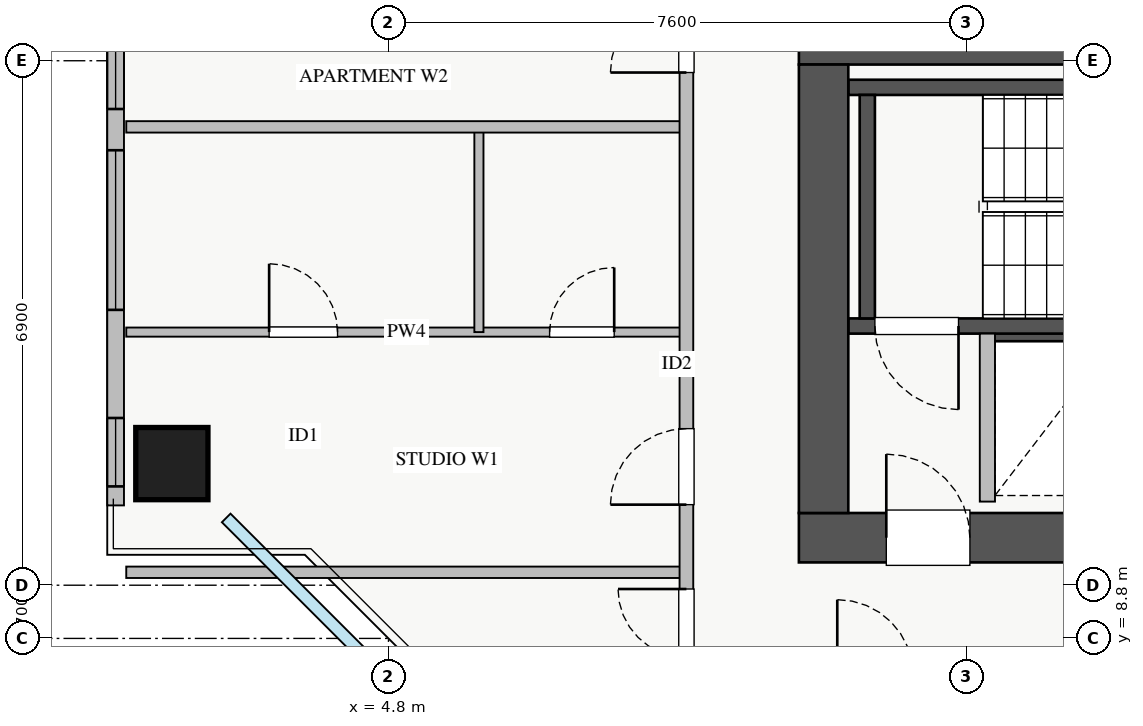
"""IFC4 building model, lengths in metres.
Left out: names, types, materials, properties, quantities, classifications, styles, units other than length and angle.
Written with IfcOpenShell. Run it as: python <this file> out.ifc"""

import sys

from ifc_helpers import new_model, si_unit, direction, frame, frame_2d, origin, origin_2d, place, context, subcontext, project, spatial, rectangle, extrude, source, transform, mapped, element, fill, save


model = new_model("IFC4")
c1 = context("Model", 3, precision=1e-05, world=origin(), true_north=direction((0.0, 1.0)))
c2 = subcontext(c1, "Body", "Model", "MODEL_VIEW")
j1 = project(units=[si_unit("LENGTHUNIT", "METRE"), si_unit("PLANEANGLEUNIT", "RADIAN")], contexts=[c1])
p1 = place(None, origin())
s1 = spatial("IfcSite", under=j1, at=p1, CompositionType="ELEMENT")
p2 = place(p1, origin())
s2 = spatial("IfcBuilding", under=s1, at=p2, CompositionType="ELEMENT")
p3 = place(p2, frame((0.0, 0.0, 179.5)))
s3 = spatial("IfcBuildingStorey", under=s2, at=p3, CompositionType="ELEMENT", Elevation=179.5)
p4 = place(p3, frame((12.68, 12.8, 0.0), z_axis=(0.0, 0.0, 1.0), x_axis=(1.0, 0.0, 0.0)))
e1 = element("IfcWall", 1, at=p4, inside=s3, PredefinedType="SHEAR", context=c2, shape_type="SweptSolid", body=[
    extrude(rectangle(XDim=1.94, YDim=0.18, at=frame_2d((0.97, 0.0))), origin(), (0.0, 0.0, 1.0), 3.07),
])
p5 = place(p3, frame((10.85, 12.91, 0.0), z_axis=(0.0, 0.0, 1.0), x_axis=(1.0, 0.0, 0.0)))
e2 = element("IfcWall", 2, at=p5, inside=s3, PredefinedType="SHEAR", context=c2, shape_type="SweptSolid", body=[
    extrude(rectangle(XDim=7.3, YDim=0.2, at=frame_2d((3.65, 0.0))), origin(), (0.0, 0.0, 1.0), 3.25),
])
p6 = place(p5, frame((0.35, 0.0, 0.0)))
e3 = element("IfcOpeningElement", 3, at=p6, cuts=e2, PredefinedType="OPENING", context=c2, shape_type="SweptSolid", body=[
    extrude(rectangle(XDim=1.1, YDim=2.05, at=frame_2d((0.55, 1.025))), frame((0.0, 0.11, 0.0), z_axis=(0.0, -1.0, 0.0), x_axis=(1.0, 0.0, 0.0)), (0.0, 0.0, 1.0), 0.22),
])
p7 = place(p3, frame((10.85, 16.05, 0.0), z_axis=(0.0, 0.0, 1.0), x_axis=(1.0, 0.0, 0.0)))
e4 = element("IfcWall", 4, at=p7, inside=s3, PredefinedType="SHEAR", context=c2, shape_type="SweptSolid", body=[
    extrude(rectangle(XDim=7.3, YDim=0.2, at=frame_2d((3.65, 0.0))), origin(), (0.0, 0.0, 1.0), 3.25),
])
p8 = place(p3, frame((11.1, 13.01, 0.0), z_axis=(0.0, 0.0, 1.0), x_axis=(0.0, 1.0, 0.0)))
e5 = element("IfcWall", 5, at=p8, inside=s3, PredefinedType="SHEAR", context=c2, shape_type="SweptSolid", body=[
    extrude(rectangle(XDim=2.94, YDim=0.2, at=frame_2d((1.47, 0.0))), origin(), (0.0, 0.0, 1.0), 3.25),
])
p9 = place(p3, frame((10.2, 10.125, 0.0), z_axis=(0.0, 0.0, 1.0), x_axis=(1.0, 0.0, 0.0)))
e6 = element("IfcWall", 6, at=p9, inside=s3, PredefinedType="SHEAR", context=c2, shape_type="SweptSolid", body=[
    extrude(rectangle(XDim=17.6, YDim=0.65, at=frame_2d((8.8, 0.0))), origin(), (0.0, 0.0, 1.0), 3.25),
])
p10 = place(p9, frame((1.15, 0.0, 0.0)))
e7 = element("IfcOpeningElement", 7, at=p10, cuts=e6, PredefinedType="OPENING", context=c2, shape_type="SweptSolid", body=[
    extrude(rectangle(XDim=1.1, YDim=2.05, at=frame_2d((0.55, 1.025))), frame((0.0, 0.335, 0.0), z_axis=(0.0, -1.0, 0.0), x_axis=(1.0, 0.0, 0.0)), (0.0, 0.0, 1.0), 0.67),
])
p11 = place(p9, frame((8.3, 0.0, 0.0)))
e8 = element("IfcOpeningElement", 8, at=p11, cuts=e6, PredefinedType="OPENING", context=c2, shape_type="SweptSolid", body=[
    extrude(rectangle(XDim=1.1, YDim=2.05, at=frame_2d((0.55, 1.025))), frame((0.0, 0.335, 0.0), z_axis=(0.0, -1.0, 0.0), x_axis=(1.0, 0.0, 0.0)), (0.0, 0.0, 1.0), 0.67),
])
p12 = place(p9, frame((4.9, 0.0, 0.0)))
e9 = element("IfcOpeningElement", 9, at=p12, cuts=e6, PredefinedType="OPENING", context=c2, shape_type="SweptSolid", body=[
    extrude(rectangle(XDim=1.1, YDim=2.05, at=frame_2d((0.55, 1.025))), frame((0.0, 0.335, 0.0), z_axis=(0.0, -1.0, 0.0), x_axis=(1.0, 0.0, 0.0)), (0.0, 0.0, 1.0), 0.67),
])
p13 = place(p9, frame((14.74, 0.0, 0.0)))
e10 = element("IfcOpeningElement", 10, at=p13, cuts=e6, PredefinedType="OPENING", context=c2, shape_type="SweptSolid", body=[
    extrude(rectangle(XDim=1.0, YDim=2.05, at=frame_2d((0.5, 1.025))), frame((0.0, 0.335, 0.0), z_axis=(0.0, -1.0, 0.0), x_axis=(1.0, 0.0, 0.0)), (0.0, 0.0, 1.0), 0.67),
])
p14 = place(p9, frame((10.64, 0.0, 0.0)))
e11 = element("IfcOpeningElement", 11, at=p14, cuts=e6, PredefinedType="OPENING", context=c2, shape_type="SweptSolid", body=[
    extrude(rectangle(XDim=1.0, YDim=2.05, at=frame_2d((0.5, 1.025))), frame((0.0, 0.335, 0.0), z_axis=(0.0, -1.0, 0.0), x_axis=(1.0, 0.0, 0.0)), (0.0, 0.0, 1.0), 0.67),
])
p15 = place(p9, frame((13.09, 0.0, 0.0)))
e12 = element("IfcOpeningElement", 12, at=p15, cuts=e6, PredefinedType="OPENING", context=c2, shape_type="SweptSolid", body=[
    extrude(rectangle(XDim=1.0, YDim=2.05, at=frame_2d((0.5, 1.025))), frame((0.0, 0.335, 0.0), z_axis=(0.0, -1.0, 0.0), x_axis=(1.0, 0.0, 0.0)), (0.0, 0.0, 1.0), 0.67),
])
p16 = place(p3, frame((10.2, 16.675, 0.0), z_axis=(0.0, 0.0, 1.0), x_axis=(1.0, 0.0, 0.0)))
e13 = element("IfcWall", 13, at=p16, inside=s3, PredefinedType="SHEAR", context=c2, shape_type="SweptSolid", body=[
    extrude(rectangle(XDim=17.6, YDim=0.65, at=frame_2d((8.8, 0.0))), origin(), (0.0, 0.0, 1.0), 3.25),
])
p17 = place(p3, frame((10.525, 10.45, 0.0), z_axis=(0.0, 0.0, 1.0), x_axis=(0.0, 1.0, 0.0)))
e14 = element("IfcWall", 14, at=p17, inside=s3, PredefinedType="SHEAR", context=c2, shape_type="SweptSolid", body=[
    extrude(rectangle(XDim=5.9, YDim=0.65, at=frame_2d((2.95, 0.0))), origin(), (0.0, 0.0, 1.0), 3.25),
])
m1 = source(origin(), c2, "Body", "SweptSolid", [
    extrude(rectangle(XDim=0.95, YDim=0.95, at=origin_2d()), origin(), (0.0, 0.0, 1.0), 3.25),
])
p18 = place(p3, frame((1.95, 11.1, 0.0), z_axis=(0.0, 0.0, 1.0), x_axis=(1.0, 0.0, 0.0)))
e15 = element("IfcColumn", 15, at=p18, inside=s3, PredefinedType="COLUMN", context=c2, shape_type="MappedRepresentation", body=[
    mapped(m1, transform((0.0, 0.0, 0.0), x_axis=(1.0, 0.0, 0.0), y_axis=(0.0, 1.0, 0.0), z_axis=(0.0, 0.0, 1.0), scale=1.0)),
])
p19 = place(p3, frame((1.21, 10.55, 0.0), z_axis=(0.0, 0.0, 1.0), x_axis=(0.0, 1.0, 0.0)))
e16 = element("IfcWall", 16, at=p19, inside=s3, PredefinedType="STANDARD", context=c2, shape_type="SweptSolid", body=[
    extrude(rectangle(XDim=24.9, YDim=0.22, at=frame_2d((12.45, 0.0))), origin(), (0.0, 0.0, 1.0), 2.61),
])
p20 = place(p19, frame((13.3, 0.0, 0.0)))
e17 = element("IfcOpeningElement", 17, at=p20, cuts=e16, PredefinedType="OPENING", context=c2, shape_type="SweptSolid", body=[
    extrude(rectangle(XDim=1.2, YDim=2.1, at=frame_2d((0.6, 1.05))), frame((0.0, 0.12, 0.0), z_axis=(0.0, -1.0, 0.0), x_axis=(1.0, 0.0, 0.0)), (0.0, 0.0, 1.0), 0.24),
])
p21 = place(p19, frame((2.573, 0.0, 0.9)))
e18 = element("IfcOpeningElement", 18, at=p21, cuts=e16, PredefinedType="OPENING", context=c2, shape_type="SweptSolid", body=[
    extrude(rectangle(XDim=2.1, YDim=1.5, at=frame_2d((1.05, 0.75))), frame((0.0, 0.12, 0.0), z_axis=(0.0, -1.0, 0.0), x_axis=(1.0, 0.0, 0.0)), (0.0, 0.0, 1.0), 0.24),
])
p22 = place(p19, frame((19.387, 0.0, 0.9)))
e19 = element("IfcOpeningElement", 19, at=p22, cuts=e16, PredefinedType="OPENING", context=c2, shape_type="SweptSolid", body=[
    extrude(rectangle(XDim=2.1, YDim=1.5, at=frame_2d((1.05, 0.75))), frame((0.0, 0.12, 0.0), z_axis=(0.0, -1.0, 0.0), x_axis=(1.0, 0.0, 0.0)), (0.0, 0.0, 1.0), 0.24),
])
p23 = place(p19, frame((22.24, 0.0, 0.9)))
e20 = element("IfcOpeningElement", 20, at=p23, cuts=e16, PredefinedType="OPENING", context=c2, shape_type="SweptSolid", body=[
    extrude(rectangle(XDim=2.4, YDim=1.5, at=frame_2d((1.2, 0.75))), frame((0.0, 0.12, 0.0), z_axis=(0.0, -1.0, 0.0), x_axis=(1.0, 0.0, 0.0)), (0.0, 0.0, 1.0), 0.24),
])
p24 = place(p19, frame((0.25, 0.0, 0.9)))
e21 = element("IfcOpeningElement", 21, at=p24, cuts=e16, PredefinedType="OPENING", context=c2, shape_type="SweptSolid", body=[
    extrude(rectangle(XDim=0.9, YDim=1.2, at=frame_2d((0.45, 0.6))), frame((0.0, 0.12, 0.0), z_axis=(0.0, -1.0, 0.0), x_axis=(1.0, 0.0, 0.0)), (0.0, 0.0, 1.0), 0.24),
])
p25 = place(p19, frame((8.01, 0.0, 0.9)))
e22 = element("IfcOpeningElement", 22, at=p25, cuts=e16, PredefinedType="OPENING", context=c2, shape_type="SweptSolid", body=[
    extrude(rectangle(XDim=0.9, YDim=1.2, at=frame_2d((0.45, 0.6))), frame((0.0, 0.12, 0.0), z_axis=(0.0, -1.0, 0.0), x_axis=(1.0, 0.0, 0.0)), (0.0, 0.0, 1.0), 0.24),
])
p26 = place(p19, frame((5.215, 0.0, 0.9)))
e23 = element("IfcOpeningElement", 23, at=p26, cuts=e16, PredefinedType="OPENING", context=c2, shape_type="SweptSolid", body=[
    extrude(rectangle(XDim=0.9, YDim=1.2, at=frame_2d((0.45, 0.6))), frame((0.0, 0.12, 0.0), z_axis=(0.0, -1.0, 0.0), x_axis=(1.0, 0.0, 0.0)), (0.0, 0.0, 1.0), 0.24),
])
p27 = place(p3, frame((12.68, 10.6, 0.0), z_axis=(0.0, 0.0, 1.0), x_axis=(0.0, 1.0, 0.0)))
e24 = element("IfcWall", 24, at=p27, inside=s3, PredefinedType="PARTITIONING", context=c2, shape_type="SweptSolid", body=[
    extrude(rectangle(XDim=2.21, YDim=0.2, at=frame_2d((1.105, 0.0))), origin(), (0.0, 0.0, 1.0), 3.07),
])
p28 = place(p3, frame((1.35, 9.67, 0.0), z_axis=(0.0, 0.0, 1.0), x_axis=(1.0, 0.0, 0.0)))
e25 = element("IfcWall", 25, at=p28, inside=s3, PredefinedType="PARTITIONING", context=c2, shape_type="SweptSolid", body=[
    extrude(rectangle(XDim=7.37, YDim=0.15, at=frame_2d((3.685, 0.0))), origin(), (0.0, 0.0, 1.0), 3.07),
])
p29 = place(p3, frame((1.35, 12.83, 0.0), z_axis=(0.0, 0.0, 1.0), x_axis=(1.0, 0.0, 0.0)))
e26 = element("IfcWall", 26, at=p29, inside=s3, PredefinedType="PLUMBINGWALL", context=c2, shape_type="SweptSolid", body=[
    extrude(rectangle(XDim=7.37, YDim=0.12, at=frame_2d((3.685, 0.0))), origin(), (0.0, 0.0, 1.0), 3.07),
])
p30 = place(p29, frame((1.88, 0.0, 0.0)))
e27 = element("IfcOpeningElement", 27, at=p30, cuts=e26, PredefinedType="OPENING", context=c2, shape_type="SweptSolid", body=[
    extrude(rectangle(XDim=0.9, YDim=2.05, at=frame_2d((0.45, 1.025))), frame((0.0, 0.07, 0.0), z_axis=(0.0, -1.0, 0.0), x_axis=(1.0, 0.0, 0.0)), (0.0, 0.0, 1.0), 0.14),
])
p31 = place(p29, frame((5.57, 0.0, 0.0)))
e28 = element("IfcOpeningElement", 28, at=p31, cuts=e26, PredefinedType="OPENING", context=c2, shape_type="SweptSolid", body=[
    extrude(rectangle(XDim=0.85, YDim=2.05, at=frame_2d((0.425, 1.025))), frame((0.0, 0.07, 0.0), z_axis=(0.0, -1.0, 0.0), x_axis=(1.0, 0.0, 0.0)), (0.0, 0.0, 1.0), 0.14),
])
p32 = place(p3, frame((5.99, 12.83, 0.0), z_axis=(0.0, 0.0, 1.0), x_axis=(0.0, 1.0, 0.0)))
e29 = element("IfcWall", 29, at=p32, inside=s3, PredefinedType="PLUMBINGWALL", context=c2, shape_type="SweptSolid", body=[
    extrude(rectangle(XDim=2.7, YDim=0.12, at=frame_2d((1.35, 0.0))), origin(), (0.0, 0.0, 1.0), 2.821),
])
p33 = place(p3, frame((1.35, 15.53, 0.0), z_axis=(0.0, 0.0, 1.0), x_axis=(1.0, 0.0, 0.0)))
e30 = element("IfcWall", 30, at=p33, inside=s3, PredefinedType="PARTITIONING", context=c2, shape_type="SweptSolid", body=[
    extrude(rectangle(XDim=7.37, YDim=0.15, at=frame_2d((3.685, 0.0))), origin(), (0.0, 0.0, 1.0), 3.07),
])
p34 = place(p3, frame((8.72, 8.31, 0.0), z_axis=(0.0, 0.0, 1.0), x_axis=(0.0, 1.0, 0.0)))
e31 = element("IfcWall", 31, at=p34, inside=s3, PredefinedType="PARTITIONING", context=c2, shape_type="SweptSolid", body=[
    extrude(rectangle(XDim=29.37, YDim=0.18, at=frame_2d((14.685, 0.0))), origin(), (0.0, 0.0, 1.0), 3.07),
])
p35 = place(p34, frame((28.06, 0.0, 0.0)))
e32 = element("IfcOpeningElement", 32, at=p35, cuts=e31, PredefinedType="OPENING", context=c2, shape_type="SweptSolid", body=[
    extrude(rectangle(XDim=0.9, YDim=2.05, at=frame_2d((0.45, 1.025))), frame((0.0, 0.1, 0.0), z_axis=(0.0, -1.0, 0.0), x_axis=(1.0, 0.0, 0.0)), (0.0, 0.0, 1.0), 0.2),
])
p36 = place(p34, frame((0.24, 0.0, 0.0)))
e33 = element("IfcOpeningElement", 33, at=p36, cuts=e31, PredefinedType="OPENING", context=c2, shape_type="SweptSolid", body=[
    extrude(rectangle(XDim=0.9, YDim=2.05, at=frame_2d((0.45, 1.025))), frame((0.0, 0.1, 0.0), z_axis=(0.0, -1.0, 0.0), x_axis=(1.0, 0.0, 0.0)), (0.0, 0.0, 1.0), 0.2),
])
p37 = place(p34, frame((2.25, 0.0, 0.0)))
e34 = element("IfcOpeningElement", 34, at=p37, cuts=e31, PredefinedType="OPENING", context=c2, shape_type="SweptSolid", body=[
    extrude(rectangle(XDim=1.0, YDim=2.05, at=frame_2d((0.5, 1.025))), frame((0.0, 0.1, 0.0), z_axis=(0.0, -1.0, 0.0), x_axis=(1.0, 0.0, 0.0)), (0.0, 0.0, 1.0), 0.2),
])
p38 = place(p34, frame((7.935, 0.0, 0.0)))
e35 = element("IfcOpeningElement", 35, at=p38, cuts=e31, PredefinedType="OPENING", context=c2, shape_type="SweptSolid", body=[
    extrude(rectangle(XDim=1.0, YDim=2.05, at=frame_2d((0.5, 1.025))), frame((0.0, 0.1, 0.0), z_axis=(0.0, -1.0, 0.0), x_axis=(1.0, 0.0, 0.0)), (0.0, 0.0, 1.0), 0.2),
])
p39 = place(p34, frame((17.3, 0.0, 0.0)))
e36 = element("IfcOpeningElement", 36, at=p39, cuts=e31, PredefinedType="OPENING", context=c2, shape_type="SweptSolid", body=[
    extrude(rectangle(XDim=1.0, YDim=2.05, at=frame_2d((0.5, 1.025))), frame((0.0, 0.1, 0.0), z_axis=(0.0, -1.0, 0.0), x_axis=(1.0, 0.0, 0.0)), (0.0, 0.0, 1.0), 0.2),
])
p40 = place(p34, frame((21.98, 0.0, 0.0)))
e37 = element("IfcOpeningElement", 37, at=p40, cuts=e31, PredefinedType="OPENING", context=c2, shape_type="SweptSolid", body=[
    extrude(rectangle(XDim=1.0, YDim=2.05, at=frame_2d((0.5, 1.025))), frame((0.0, 0.1, 0.0), z_axis=(0.0, -1.0, 0.0), x_axis=(1.0, 0.0, 0.0)), (0.0, 0.0, 1.0), 0.2),
])
m2 = source(origin(), c2, "Body", "SweptSolid", [
    extrude(rectangle(XDim=2.1, YDim=1.5, at=frame_2d((1.05, 0.75))), frame((0.0, 0.03, 0.0), z_axis=(0.0, -1.0, 0.0), x_axis=(1.0, 0.0, 0.0)), (0.0, 0.0, 1.0), 0.06),
])
p41 = place(p21, origin())
e38 = element("IfcWindow", 38, at=p41, inside=s3, PartitioningType="TRIPLE_PANEL_VERTICAL", PredefinedType="WINDOW", context=c2, shape_type="MappedRepresentation", body=[
    mapped(m2, transform((0.0, 0.0, 0.0), x_axis=(1.0, 0.0, 0.0), y_axis=(0.0, 1.0, 0.0), z_axis=(0.0, 0.0, 1.0), scale=1.0)),
])
fill(e18, e38)
m3 = source(origin(), c2, "Body", "SweptSolid", [
    extrude(rectangle(XDim=1.1, YDim=2.05, at=frame_2d((0.55, 1.025))), frame((0.0, 0.025, 0.0), z_axis=(0.0, -1.0, 0.0), x_axis=(1.0, 0.0, 0.0)), (0.0, 0.0, 1.0), 0.05),
])
p42 = place(p10, origin())
e39 = element("IfcDoor", 39, at=p42, inside=s3, OperationType="SINGLE_SWING_LEFT", PredefinedType="DOOR", context=c2, shape_type="MappedRepresentation", body=[
    mapped(m3, transform((0.0, 0.0, 0.0), x_axis=(1.0, 0.0, 0.0), y_axis=(0.0, 1.0, 0.0), z_axis=(0.0, 0.0, 1.0), scale=1.0)),
])
fill(e7, e39)
p43 = place(p6, frame((1.1, 0.0, 0.0), z_axis=(0.0, 0.0, 1.0), x_axis=(-1.0, 0.0, 0.0)))
e40 = element("IfcDoor", 40, at=p43, inside=s3, OperationType="SINGLE_SWING_RIGHT", PredefinedType="DOOR", context=c2, shape_type="MappedRepresentation", body=[
    mapped(m3, transform((0.0, 0.0, 0.0), x_axis=(1.0, 0.0, 0.0), y_axis=(0.0, 1.0, 0.0), z_axis=(0.0, 0.0, 1.0), scale=1.0)),
])
fill(e3, e40)
m4 = source(origin(), c2, "Body", "SweptSolid", [
    extrude(rectangle(XDim=0.9, YDim=2.05, at=frame_2d((0.45, 1.025))), frame((0.0, 0.025, 0.0), z_axis=(0.0, -1.0, 0.0), x_axis=(1.0, 0.0, 0.0)), (0.0, 0.0, 1.0), 0.05),
])
p44 = place(p30, origin())
e41 = element("IfcDoor", 41, at=p44, inside=s3, OperationType="SINGLE_SWING_LEFT", PredefinedType="DOOR", context=c2, shape_type="MappedRepresentation", body=[
    mapped(m4, transform((0.0, 0.0, 0.0), x_axis=(1.0, 0.0, 0.0), y_axis=(0.0, 1.0, 0.0), z_axis=(0.0, 0.0, 1.0), scale=1.0)),
])
fill(e27, e41)
m5 = source(origin(), c2, "Body", "SweptSolid", [
    extrude(rectangle(XDim=0.85, YDim=2.05, at=frame_2d((0.425, 1.025))), frame((0.0, 0.025, 0.0), z_axis=(0.0, -1.0, 0.0), x_axis=(1.0, 0.0, 0.0)), (0.0, 0.0, 1.0), 0.05),
])
p45 = place(p31, origin())
e42 = element("IfcDoor", 42, at=p45, inside=s3, OperationType="SINGLE_SWING_RIGHT", PredefinedType="DOOR", context=c2, shape_type="MappedRepresentation", body=[
    mapped(m5, transform((0.0, 0.0, 0.0), x_axis=(1.0, 0.0, 0.0), y_axis=(0.0, 1.0, 0.0), z_axis=(0.0, 0.0, 1.0), scale=1.0)),
])
fill(e28, e42)
p46 = place(p36, origin())
e43 = element("IfcDoor", 43, at=p46, inside=s3, OperationType="SINGLE_SWING_RIGHT", PredefinedType="DOOR", context=c2, shape_type="MappedRepresentation", body=[
    mapped(m4, transform((0.0, 0.0, 0.0), x_axis=(1.0, 0.0, 0.0), y_axis=(0.0, 1.0, 0.0), z_axis=(0.0, 0.0, 1.0), scale=1.0)),
])
fill(e33, e43)
m6 = source(origin(), c2, "Body", "SweptSolid", [
    extrude(rectangle(XDim=1.0, YDim=2.05, at=frame_2d((0.5, 1.025))), frame((0.0, 0.025, 0.0), z_axis=(0.0, -1.0, 0.0), x_axis=(1.0, 0.0, 0.0)), (0.0, 0.0, 1.0), 0.05),
])
p47 = place(p37, origin())
e44 = element("IfcDoor", 44, at=p47, inside=s3, OperationType="SINGLE_SWING_LEFT", PredefinedType="DOOR", context=c2, shape_type="MappedRepresentation", body=[
    mapped(m6, transform((0.0, 0.0, 0.0), x_axis=(1.0, 0.0, 0.0), y_axis=(0.0, 1.0, 0.0), z_axis=(0.0, 0.0, 1.0), scale=1.0)),
])
fill(e34, e44)
p48 = place(p38, origin())
e45 = element("IfcDoor", 45, at=p48, inside=s3, OperationType="SINGLE_SWING_LEFT", PredefinedType="DOOR", context=c2, shape_type="MappedRepresentation", body=[
    mapped(m6, transform((0.0, 0.0, 0.0), x_axis=(1.0, 0.0, 0.0), y_axis=(0.0, 1.0, 0.0), z_axis=(0.0, 0.0, 1.0), scale=1.0)),
])
fill(e35, e45)
m7 = source(origin(), c2, "Body", "SweptSolid", [
    extrude(rectangle(XDim=0.9, YDim=1.2, at=frame_2d((0.45, 0.6))), frame((0.0, 0.03, 0.0), z_axis=(0.0, -1.0, 0.0), x_axis=(1.0, 0.0, 0.0)), (0.0, 0.0, 1.0), 0.06),
])
p49 = place(p24, origin())
e46 = element("IfcWindow", 46, at=p49, inside=s3, PartitioningType="SINGLE_PANEL", PredefinedType="WINDOW", context=c2, shape_type="MappedRepresentation", body=[
    mapped(m7, transform((0.0, 0.0, 0.0), x_axis=(1.0, 0.0, 0.0), y_axis=(0.0, 1.0, 0.0), z_axis=(0.0, 0.0, 1.0), scale=1.0)),
])
fill(e21, e46)
p50 = place(p26, origin())
e47 = element("IfcWindow", 47, at=p50, inside=s3, PartitioningType="SINGLE_PANEL", PredefinedType="WINDOW", context=c2, shape_type="MappedRepresentation", body=[
    mapped(m7, transform((0.0, 0.0, 0.0), x_axis=(1.0, 0.0, 0.0), y_axis=(0.0, 1.0, 0.0), z_axis=(0.0, 0.0, 1.0), scale=1.0)),
])
fill(e23, e47)
save(model, sys.argv[1])
